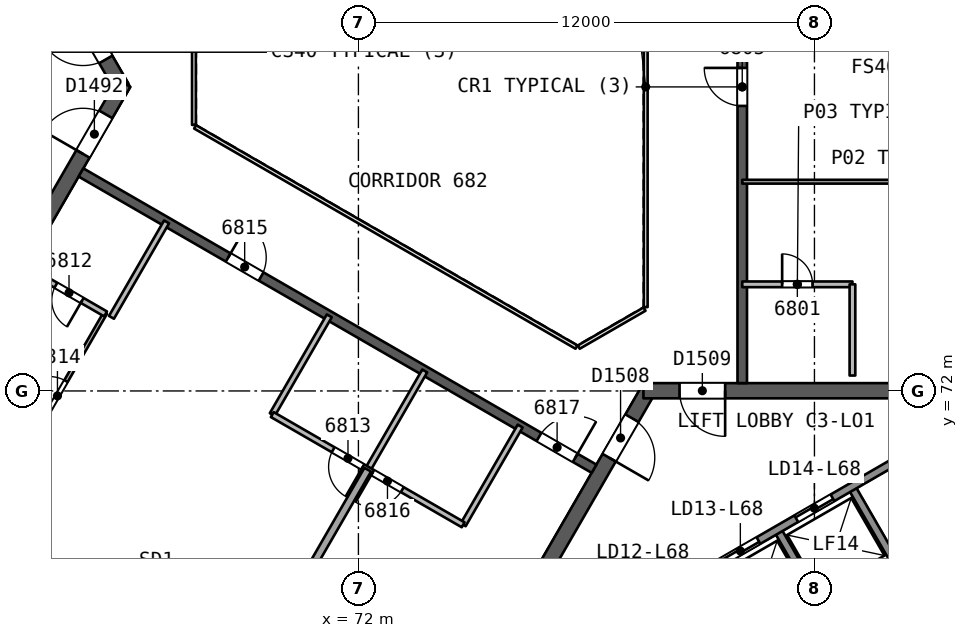
"""IFC4 building model, lengths in metres.
Left out: names, types, materials, properties, quantities, classifications, styles, units other than length and angle.
Written with IfcOpenShell. Run it as: python <this file> out.ifc"""

import sys

from ifc_helpers import new_model, si_unit, direction, frame, frame_2d, origin, place, context, subcontext, project, spatial, rectangle, extrude, element, fill, save


model = new_model("IFC4")
c1 = context("Model", 3, precision=1e-05, world=origin(), true_north=direction((0.0, 1.0)))
c2 = subcontext(c1, "Body", "Model", "MODEL_VIEW")
j1 = project(units=[si_unit("LENGTHUNIT", "METRE"), si_unit("PLANEANGLEUNIT", "RADIAN")], contexts=[c1])
p1 = place(None, origin())
s1 = spatial("IfcSite", under=j1, at=p1, CompositionType="ELEMENT")
p2 = place(p1, origin())
s2 = spatial("IfcBuilding", under=s1, at=p2, CompositionType="ELEMENT")
p3 = place(p2, frame((0.0, 0.0, 277.5)))
s3 = spatial("IfcBuildingStorey", under=s2, at=p3, CompositionType="ELEMENT", Elevation=277.5)
p4 = place(p3, frame((65.769, 80.0, 0.0), z_axis=(0.0, 0.0, 1.0), x_axis=(-0.50000177223, 0.866024380585, 0.0)))
e1 = element("IfcWall", 1, at=p4, inside=s3, PredefinedType="SHEAR", context=c2, shape_type="SweptSolid", body=[
    extrude(rectangle(XDim=10.265, YDim=0.4, at=frame_2d((5.132, 0.0))), origin(), (0.0, 0.0, 1.0), 3.7),
])
p5 = place(p4, frame((0.834, 0.0, 0.0)))
e2 = element("IfcOpeningElement", 2, at=p5, cuts=e1, PredefinedType="OPENING", context=c2, shape_type="SweptSolid", body=[
    extrude(rectangle(XDim=1.2, YDim=2.1, at=frame_2d((0.6, 1.05))), frame((0.0, 0.21, 0.0), z_axis=(0.0, -1.0, 0.0), x_axis=(1.0, 0.0, 0.0)), (0.0, 0.0, 1.0), 0.421),
])
p6 = place(p3, frame((60.737, 71.284, 0.0), z_axis=(0.0, 0.0, 1.0), x_axis=(0.50000547566, 0.866022242388, 0.0)))
e3 = element("IfcWall", 3, at=p6, inside=s3, PredefinedType="SHEAR", context=c2, shape_type="SweptSolid", body=[
    extrude(rectangle(XDim=10.18, YDim=0.4, at=frame_2d((5.09, 0.0))), origin(), (0.0, 0.0, 1.0), 3.7),
])
p7 = place(p6, frame((8.03, 0.0, 0.0)))
e4 = element("IfcOpeningElement", 4, at=p7, cuts=e3, PredefinedType="OPENING", context=c2, shape_type="SweptSolid", body=[
    extrude(rectangle(XDim=1.2, YDim=2.1, at=frame_2d((0.6, 1.05))), frame((0.0, 0.21, 0.0), z_axis=(0.0, -1.0, 0.0), x_axis=(1.0, 0.0, 0.0)), (0.0, 0.0, 1.0), 0.421),
])
p8 = place(p3, frame((79.615, 72.006, 0.0), z_axis=(0.0, 0.0, 1.0), x_axis=(-0.50000177223, -0.866024380585, 0.0)))
e5 = element("IfcWall", 5, at=p8, inside=s3, PredefinedType="SHEAR", context=c2, shape_type="SweptSolid", body=[
    extrude(rectangle(XDim=10.265, YDim=0.4, at=frame_2d((5.132, 0.0))), origin(), (0.0, 0.0, 1.0), 3.7),
])
p9 = place(p8, frame((0.834, 0.0, 0.0)))
e6 = element("IfcOpeningElement", 6, at=p9, cuts=e5, PredefinedType="OPENING", context=c2, shape_type="SweptSolid", body=[
    extrude(rectangle(XDim=1.2, YDim=2.1, at=frame_2d((0.6, 1.05))), frame((0.0, 0.21, 0.0), z_axis=(0.0, -1.0, 0.0), x_axis=(1.0, 0.0, 0.0)), (0.0, 0.0, 1.0), 0.421),
])
p10 = place(p3, frame((89.68, 72.006, 0.0), z_axis=(0.0, 0.0, 1.0), x_axis=(-1.0, 0.0, 0.0)))
e7 = element("IfcWall", 7, at=p10, inside=s3, PredefinedType="SHEAR", context=c2, shape_type="SweptSolid", body=[
    extrude(rectangle(XDim=10.18, YDim=0.4, at=frame_2d((5.09, 0.0))), origin(), (0.0, 0.0, 1.0), 3.7),
])
p11 = place(p10, frame((8.03, 0.0, 0.0)))
e8 = element("IfcOpeningElement", 8, at=p11, cuts=e7, PredefinedType="OPENING", context=c2, shape_type="SweptSolid", body=[
    extrude(rectangle(XDim=1.2, YDim=2.1, at=frame_2d((0.6, 1.05))), frame((0.0, 0.21, 0.0), z_axis=(0.0, -1.0, 0.0), x_axis=(1.0, 0.0, 0.0)), (0.0, 0.0, 1.0), 0.421),
])
p12 = place(p3, frame((82.1, 72.206, 0.0), z_axis=(0.0, 0.0, 1.0), x_axis=(0.0, 1.0, 0.0)))
e9 = element("IfcWall", 9, at=p12, inside=s3, PredefinedType="SHEAR", context=c2, shape_type="SweptSolid", body=[
    extrude(rectangle(XDim=15.588, YDim=0.25, at=frame_2d((7.794, 0.0))), origin(), (0.0, 0.0, 1.0), 3.3),
])
p13 = place(p12, frame((7.294, 0.0, 0.0)))
e10 = element("IfcOpeningElement", 10, at=p13, cuts=e9, PredefinedType="OPENING", context=c2, shape_type="SweptSolid", body=[
    extrude(rectangle(XDim=1.0, YDim=2.1, at=frame_2d((0.5, 1.05))), frame((0.0, 0.135, 0.0), z_axis=(0.0, -1.0, 0.0), x_axis=(1.0, 0.0, 0.0)), (0.0, 0.0, 1.0), 0.271),
])
p14 = place(p3, frame((64.7, 77.748, 0.0), z_axis=(0.0, 0.0, 1.0), x_axis=(0.866026492143, -0.499998114903, 0.0)))
e11 = element("IfcWall", 11, at=p14, inside=s3, PredefinedType="SHEAR", context=c2, shape_type="SweptSolid", body=[
    extrude(rectangle(XDim=15.588, YDim=0.25, at=frame_2d((7.794, 0.0))), origin(), (0.0, 0.0, 1.0), 3.3),
])
p15 = place(p14, frame((4.473, 0.0, 0.0)))
e12 = element("IfcOpeningElement", 12, at=p15, cuts=e11, PredefinedType="OPENING", context=c2, shape_type="SweptSolid", body=[
    extrude(rectangle(XDim=1.0, YDim=2.1, at=frame_2d((0.5, 1.05))), frame((0.0, 0.135, 0.0), z_axis=(0.0, -1.0, 0.0), x_axis=(1.0, 0.0, 0.0)), (0.0, 0.0, 1.0), 0.271),
])
p16 = place(p14, frame((13.917, 0.0, 0.0)))
e13 = element("IfcOpeningElement", 13, at=p16, cuts=e11, PredefinedType="OPENING", context=c2, shape_type="SweptSolid", body=[
    extrude(rectangle(XDim=1.1, YDim=2.1, at=frame_2d((0.55, 1.05))), frame((0.0, 0.135, 0.0), z_axis=(0.0, -1.0, 0.0), x_axis=(1.0, 0.0, 0.0)), (0.0, 0.0, 1.0), 0.271),
])
p17 = place(p3, frame((91.353, 77.506, 0.0), z_axis=(0.0, 0.0, 1.0), x_axis=(-1.0, 0.0, 0.0)))
e14 = element("IfcWall", 14, at=p17, inside=s3, PredefinedType="PARTITIONING", context=c2, shape_type="SweptSolid", body=[
    extrude(rectangle(XDim=9.253, YDim=0.1, at=frame_2d((4.626, 0.0))), origin(), (0.0, 0.0, 1.0), 3.3),
])
p18 = place(p17, frame((3.903, 0.0, 0.0)))
e15 = element("IfcOpeningElement", 15, at=p18, cuts=e14, PredefinedType="OPENING", context=c2, shape_type="SweptSolid", body=[
    extrude(rectangle(XDim=0.9, YDim=2.1, at=frame_2d((0.45, 1.05))), frame((0.0, 0.061, 0.0), z_axis=(0.0, -1.0, 0.0), x_axis=(1.0, 0.0, 0.0)), (0.0, 0.0, 1.0), 0.121),
])
p19 = place(p3, frame((82.1, 74.806, 0.0), z_axis=(0.0, 0.0, 1.0), x_axis=(1.0, 0.0, 0.0)))
e16 = element("IfcWall", 16, at=p19, inside=s3, PredefinedType="PARTITIONING", context=c2, shape_type="SweptSolid", body=[
    extrude(rectangle(XDim=2.9, YDim=0.15, at=frame_2d((1.45, 0.0))), origin(), (0.0, 0.0, 1.0), 3.3),
])
p20 = place(p19, frame((1.05, 0.0, 0.0)))
e17 = element("IfcOpeningElement", 17, at=p20, cuts=e16, PredefinedType="OPENING", context=c2, shape_type="SweptSolid", body=[
    extrude(rectangle(XDim=0.8, YDim=2.1, at=frame_2d((0.4, 1.05))), frame((0.0, 0.085, 0.0), z_axis=(0.0, -1.0, 0.0), x_axis=(1.0, 0.0, 0.0)), (0.0, 0.0, 1.0), 0.171),
])
p21 = place(p3, frame((85.0, 74.806, 0.0), z_axis=(0.0, 0.0, 1.0), x_axis=(0.0, -1.0, 0.0)))
e18 = element("IfcWall", 18, at=p21, inside=s3, PredefinedType="PARTITIONING", context=c2, shape_type="SweptSolid", body=[
    extrude(rectangle(XDim=2.4, YDim=0.15, at=frame_2d((1.2, 0.0))), origin(), (0.0, 0.0, 1.0), 3.3),
])
p22 = place(p3, frame((62.154, 68.534, 0.0), z_axis=(0.0, 0.0, 1.0), x_axis=(0.499987773676, 0.866032462541, 0.0)))
e19 = element("IfcWall", 19, at=p22, inside=s3, PredefinedType="PARTITIONING", context=c2, shape_type="SweptSolid", body=[
    extrude(rectangle(XDim=6.372, YDim=0.1, at=frame_2d((3.186, 0.0))), origin(), (0.0, 0.0, 1.0), 3.3),
])
p23 = place(p22, frame((3.403, 0.0, 0.0)))
e20 = element("IfcOpeningElement", 20, at=p23, cuts=e19, PredefinedType="OPENING", context=c2, shape_type="SweptSolid", body=[
    extrude(rectangle(XDim=0.9, YDim=2.1, at=frame_2d((0.45, 1.05))), frame((0.0, 0.061, 0.0), z_axis=(0.0, -1.0, 0.0), x_axis=(1.0, 0.0, 0.0)), (0.0, 0.0, 1.0), 0.121),
])
p24 = place(p3, frame((65.347, 74.026, 0.0), z_axis=(0.0, 0.0, 1.0), x_axis=(-0.866042797968, 0.49996987118, 0.0)))
e21 = element("IfcWall", 21, at=p24, inside=s3, PredefinedType="PARTITIONING", context=c2, shape_type="SweptSolid", body=[
    extrude(rectangle(XDim=2.221, YDim=0.15, at=frame_2d((1.11, 0.0))), origin(), (0.0, 0.0, 1.0), 3.3),
])
p25 = place(p24, frame((0.711, 0.0, 0.0)))
e22 = element("IfcOpeningElement", 22, at=p25, cuts=e21, PredefinedType="OPENING", context=c2, shape_type="SweptSolid", body=[
    extrude(rectangle(XDim=0.8, YDim=2.1, at=frame_2d((0.4, 1.05))), frame((0.0, 0.085, 0.0), z_axis=(0.0, -1.0, 0.0), x_axis=(1.0, 0.0, 0.0)), (0.0, 0.0, 1.0), 0.171),
])
p26 = place(p3, frame((66.952, 76.448, 0.0), z_axis=(0.0, 0.0, 1.0), x_axis=(-0.499987231761, -0.866032775405, 0.0)))
e23 = element("IfcWall", 23, at=p26, inside=s3, PredefinedType="PARTITIONING", context=c2, shape_type="SweptSolid", body=[
    extrude(rectangle(XDim=2.9, YDim=0.15, at=frame_2d((1.45, 0.0))), origin(), (0.0, 0.0, 1.0), 3.3),
])
p27 = place(p3, frame((73.745, 72.526, 0.0), z_axis=(0.0, 0.0, 1.0), x_axis=(-0.50002537861, -0.866010750942, 0.0)))
e24 = element("IfcWall", 24, at=p27, inside=s3, PredefinedType="PARTITIONING", context=c2, shape_type="SweptSolid", body=[
    extrude(rectangle(XDim=3.0, YDim=0.15, at=frame_2d((1.5, 0.0))), origin(), (0.0, 0.0, 1.0), 3.3),
])
p28 = place(p3, frame((69.734, 71.378, 0.0), z_axis=(0.0, 0.0, 1.0), x_axis=(0.499990139034, 0.866031096941, 0.0)))
e25 = element("IfcWall", 25, at=p28, inside=s3, PredefinedType="PARTITIONING", context=c2, shape_type="SweptSolid", body=[
    extrude(rectangle(XDim=3.0, YDim=0.15, at=frame_2d((1.5, 0.0))), origin(), (0.0, 0.0, 1.0), 3.3),
])
p29 = place(p3, frame((69.118, 64.512, 0.0), z_axis=(0.0, 0.0, 1.0), x_axis=(0.499997275202, 0.866026976941, 0.0)))
e26 = element("IfcWall", 26, at=p29, inside=s3, PredefinedType="PARTITIONING", context=c2, shape_type="SweptSolid", body=[
    extrude(rectangle(XDim=6.254, YDim=0.2, at=frame_2d((3.127, 0.0))), origin(), (0.0, 0.0, 1.0), 3.3),
])
p30 = place(p3, frame((76.257, 71.076, 0.0), z_axis=(0.0, 0.0, 1.0), x_axis=(-0.499990139034, -0.866031096941, 0.0)))
e27 = element("IfcWall", 27, at=p30, inside=s3, PredefinedType="PARTITIONING", context=c2, shape_type="SweptSolid", body=[
    extrude(rectangle(XDim=3.0, YDim=0.15, at=frame_2d((1.5, 0.0))), origin(), (0.0, 0.0, 1.0), 3.3),
])
p31 = place(p3, frame((74.757, 68.478, 0.0), z_axis=(0.0, 0.0, 1.0), x_axis=(-0.86601454848, 0.500018801468, 0.0)))
e28 = element("IfcWall", 28, at=p31, inside=s3, PredefinedType="PARTITIONING", context=c2, shape_type="SweptSolid", body=[
    extrude(rectangle(XDim=5.8, YDim=0.15, at=frame_2d((2.9, 0.0))), origin(), (0.0, 0.0, 1.0), 3.3),
])
p32 = place(p31, frame((3.05, 0.0, 0.0)))
e29 = element("IfcOpeningElement", 29, at=p32, cuts=e28, PredefinedType="OPENING", context=c2, shape_type="SweptSolid", body=[
    extrude(rectangle(XDim=0.9, YDim=2.1, at=frame_2d((0.45, 1.05))), frame((0.0, 0.085, 0.0), z_axis=(0.0, -1.0, 0.0), x_axis=(1.0, 0.0, 0.0)), (0.0, 0.0, 1.0), 0.171),
])
p33 = place(p31, frame((1.85, 0.0, 0.0)))
e30 = element("IfcOpeningElement", 30, at=p33, cuts=e28, PredefinedType="OPENING", context=c2, shape_type="SweptSolid", body=[
    extrude(rectangle(XDim=0.9, YDim=2.1, at=frame_2d((0.45, 1.05))), frame((0.0, 0.085, 0.0), z_axis=(0.0, -1.0, 0.0), x_axis=(1.0, 0.0, 0.0)), (0.0, 0.0, 1.0), 0.171),
])
p34 = place(p3, frame((87.299, 53.843, 0.0), z_axis=(0.0, 0.0, 1.0), x_axis=(-0.866024279277, 0.500001947699, 0.0)))
e31 = element("IfcWall", 31, at=p34, inside=s3, PredefinedType="SOLIDWALL", context=c2, shape_type="SweptSolid", body=[
    extrude(rectangle(XDim=47.46, YDim=0.3, at=frame_2d((23.73, 0.0))), origin(), (0.0, 0.0, 1.0), 3.3),
])
p35 = place(p34, frame((17.308, 0.0, 0.0)))
e32 = element("IfcOpeningElement", 32, at=p35, cuts=e31, PredefinedType="OPENING", context=c2, shape_type="SweptSolid", body=[
    extrude(rectangle(XDim=2.4, YDim=2.4, at=frame_2d((1.2, 1.2))), frame((0.0, 0.161, 0.0), z_axis=(0.0, -1.0, 0.0), x_axis=(1.0, 0.0, 0.0)), (0.0, 0.0, 1.0), 0.321),
])
p36 = place(p34, frame((37.135, 0.0, 0.0)))
e33 = element("IfcOpeningElement", 33, at=p36, cuts=e31, PredefinedType="OPENING", context=c2, shape_type="SweptSolid", body=[
    extrude(rectangle(XDim=2.4, YDim=2.4, at=frame_2d((1.2, 1.2))), frame((0.0, 0.161, 0.0), z_axis=(0.0, -1.0, 0.0), x_axis=(1.0, 0.0, 0.0)), (0.0, 0.0, 1.0), 0.321),
])
p37 = place(p34, frame((23.901, 0.0, 0.0)))
e34 = element("IfcOpeningElement", 34, at=p37, cuts=e31, PredefinedType="OPENING", context=c2, shape_type="SweptSolid", body=[
    extrude(rectangle(XDim=2.4, YDim=2.4, at=frame_2d((1.2, 1.2))), frame((0.0, 0.161, 0.0), z_axis=(0.0, -1.0, 0.0), x_axis=(1.0, 0.0, 0.0)), (0.0, 0.0, 1.0), 0.321),
])
p38 = place(p3, frame((83.024, 68.352, 0.0), z_axis=(0.0, 0.0, 1.0), x_axis=(0.50000366821, -0.866023285932, 0.0)))
e35 = element("IfcWall", 35, at=p38, inside=s3, PredefinedType="SOLIDWALL", context=c2, shape_type="SweptSolid", body=[
    extrude(rectangle(XDim=2.48, YDim=0.2, at=frame_2d((1.24, 0.0))), origin(), (0.0, 0.0, 1.0), 3.3),
])
p39 = place(p3, frame((84.973, 69.477, 0.0), z_axis=(0.0, 0.0, 1.0), x_axis=(0.499996545922, -0.866027397988, 0.0)))
e36 = element("IfcWall", 36, at=p39, inside=s3, PredefinedType="SOLIDWALL", context=c2, shape_type="SweptSolid", body=[
    extrude(rectangle(XDim=2.75, YDim=0.2, at=frame_2d((1.375, 0.0))), origin(), (0.0, 0.0, 1.0), 3.3),
])
p40 = place(p3, frame((77.135, 64.952, 0.0), z_axis=(0.0, 0.0, 1.0), x_axis=(0.866031916153, 0.499988720078, 0.0)))
e37 = element("IfcWall", 37, at=p40, inside=s3, PredefinedType="SOLIDWALL", context=c2, shape_type="SweptSolid", body=[
    extrude(rectangle(XDim=11.35, YDim=0.2, at=frame_2d((5.675, 0.0))), origin(), (0.0, 0.0, 1.0), 3.3),
])
p41 = place(p40, frame((2.875, 0.0, 0.0)))
e38 = element("IfcOpeningElement", 38, at=p41, cuts=e37, PredefinedType="OPENING", context=c2, shape_type="SweptSolid", body=[
    extrude(rectangle(XDim=1.1, YDim=2.1, at=frame_2d((0.55, 1.05))), frame((0.0, 0.11, 0.0), z_axis=(0.0, -1.0, 0.0), x_axis=(1.0, 0.0, 0.0)), (0.0, 0.0, 1.0), 0.221),
])
p42 = place(p40, frame((5.125, 0.0, 0.0)))
e39 = element("IfcOpeningElement", 39, at=p42, cuts=e37, PredefinedType="OPENING", context=c2, shape_type="SweptSolid", body=[
    extrude(rectangle(XDim=1.1, YDim=2.1, at=frame_2d((0.55, 1.05))), frame((0.0, 0.11, 0.0), z_axis=(0.0, -1.0, 0.0), x_axis=(1.0, 0.0, 0.0)), (0.0, 0.0, 1.0), 0.221),
])
p43 = place(p40, frame((7.375, 0.0, 0.0)))
e40 = element("IfcOpeningElement", 40, at=p43, cuts=e37, PredefinedType="OPENING", context=c2, shape_type="SweptSolid", body=[
    extrude(rectangle(XDim=1.1, YDim=2.1, at=frame_2d((0.55, 1.05))), frame((0.0, 0.11, 0.0), z_axis=(0.0, -1.0, 0.0), x_axis=(1.0, 0.0, 0.0)), (0.0, 0.0, 1.0), 0.221),
])
p44 = place(p3, frame((79.56, 74.206, 0.0), z_axis=(0.0, 0.0, 1.0), x_axis=(0.0, 1.0, 0.0)))
e41 = element("IfcWall", 41, at=p44, inside=s3, PredefinedType="PARTITIONING", context=c2, shape_type="SweptSolid", body=[
    extrude(rectangle(XDim=11.588, YDim=0.1, at=frame_2d((5.794, 0.0))), origin(), (0.0, 0.0, 1.0), 3.3),
])
p45 = place(p3, frame((67.672, 81.0, 0.0), z_axis=(0.0, 0.0, 1.0), x_axis=(0.0, -1.0, 0.0)))
e42 = element("IfcWall", 42, at=p45, inside=s3, PredefinedType="PARTITIONING", context=c2, shape_type="SweptSolid", body=[
    extrude(rectangle(XDim=2.0, YDim=0.1, at=frame_2d((1.0, 0.0))), origin(), (0.0, 0.0, 1.0), 3.3),
])
p46 = place(p3, frame((67.702, 78.948, 0.0), z_axis=(0.0, 0.0, 1.0), x_axis=(0.866026658274, -0.499997827154, 0.0)))
e43 = element("IfcWall", 43, at=p46, inside=s3, PredefinedType="PARTITIONING", context=c2, shape_type="SweptSolid", body=[
    extrude(rectangle(XDim=11.588, YDim=0.1, at=frame_2d((5.794, 0.0))), origin(), (0.0, 0.0, 1.0), 3.3),
])
p47 = place(p3, frame((77.798, 73.154, 0.0), z_axis=(0.0, 0.0, 1.0), x_axis=(0.866041268327, 0.499972520799, 0.0)))
e44 = element("IfcWall", 44, at=p47, inside=s3, PredefinedType="PARTITIONING", context=c2, shape_type="SweptSolid", body=[
    extrude(rectangle(XDim=2.0, YDim=0.1, at=frame_2d((1.0, 0.0))), origin(), (0.0, 0.0, 1.0), 3.3),
])
p48 = place(p20, origin())
e45 = element("IfcDoor", 45, at=p48, inside=s3, OperationType="SINGLE_SWING_LEFT", PredefinedType="NOTDEFINED", context=c2, shape_type="SweptSolid", body=[
    extrude(rectangle(XDim=0.8, YDim=2.1, at=frame_2d((0.4, 1.05))), frame((0.0, 0.025, 0.0), z_axis=(0.0, -1.0, 0.0), x_axis=(1.0, 0.0, 0.0)), (0.0, 0.0, 1.0), 0.05),
])
fill(e17, e45)
p49 = place(p13, origin())
e46 = element("IfcDoor", 46, at=p49, inside=s3, OperationType="SINGLE_SWING_RIGHT", PredefinedType="NOTDEFINED", context=c2, shape_type="SweptSolid", body=[
    extrude(rectangle(XDim=1.0, YDim=2.1, at=frame_2d((0.5, 1.05))), frame((0.0, 0.025, 0.0), z_axis=(0.0, -1.0, 0.0), x_axis=(1.0, 0.0, 0.0)), (0.0, 0.0, 1.0), 0.05),
])
fill(e10, e46)
p50 = place(p25, origin())
e47 = element("IfcDoor", 47, at=p50, inside=s3, OperationType="SINGLE_SWING_LEFT", PredefinedType="NOTDEFINED", context=c2, shape_type="SweptSolid", body=[
    extrude(rectangle(XDim=0.8, YDim=2.1, at=frame_2d((0.4, 1.05))), frame((0.0, 0.025, 0.0), z_axis=(0.0, -1.0, 0.0), x_axis=(1.0, 0.0, 0.0)), (0.0, 0.0, 1.0), 0.05),
])
fill(e22, e47)
p51 = place(p32, origin())
e48 = element("IfcDoor", 48, at=p51, inside=s3, OperationType="SINGLE_SWING_LEFT", PredefinedType="NOTDEFINED", context=c2, shape_type="SweptSolid", body=[
    extrude(rectangle(XDim=0.9, YDim=2.1, at=frame_2d((0.45, 1.05))), frame((0.0, 0.025, 0.0), z_axis=(0.0, -1.0, 0.0), x_axis=(1.0, 0.0, 0.0)), (0.0, 0.0, 1.0), 0.05),
])
fill(e29, e48)
p52 = place(p23, origin())
e49 = element("IfcDoor", 49, at=p52, inside=s3, OperationType="SINGLE_SWING_LEFT", PredefinedType="NOTDEFINED", context=c2, shape_type="SweptSolid", body=[
    extrude(rectangle(XDim=0.9, YDim=2.1, at=frame_2d((0.45, 1.05))), frame((0.0, 0.025, 0.0), z_axis=(0.0, -1.0, 0.0), x_axis=(1.0, 0.0, 0.0)), (0.0, 0.0, 1.0), 0.05),
])
fill(e20, e49)
p53 = place(p15, origin())
e50 = element("IfcDoor", 50, at=p53, inside=s3, OperationType="SINGLE_SWING_LEFT", PredefinedType="NOTDEFINED", context=c2, shape_type="SweptSolid", body=[
    extrude(rectangle(XDim=1.0, YDim=2.1, at=frame_2d((0.5, 1.05))), frame((0.0, 0.025, 0.0), z_axis=(0.0, -1.0, 0.0), x_axis=(1.0, 0.0, 0.0)), (0.0, 0.0, 1.0), 0.05),
])
fill(e12, e50)
p54 = place(p33, origin())
e51 = element("IfcDoor", 51, at=p54, inside=s3, OperationType="SINGLE_SWING_RIGHT", PredefinedType="NOTDEFINED", context=c2, shape_type="SweptSolid", body=[
    extrude(rectangle(XDim=0.9, YDim=2.1, at=frame_2d((0.45, 1.05))), frame((0.0, 0.025, 0.0), z_axis=(0.0, -1.0, 0.0), x_axis=(1.0, 0.0, 0.0)), (0.0, 0.0, 1.0), 0.05),
])
fill(e30, e51)
p55 = place(p16, origin())
e52 = element("IfcDoor", 52, at=p55, inside=s3, OperationType="SINGLE_SWING_RIGHT", PredefinedType="NOTDEFINED", context=c2, shape_type="SweptSolid", body=[
    extrude(rectangle(XDim=1.1, YDim=2.1, at=frame_2d((0.55, 1.05))), frame((0.0, 0.025, 0.0), z_axis=(0.0, -1.0, 0.0), x_axis=(1.0, 0.0, 0.0)), (0.0, 0.0, 1.0), 0.05),
])
fill(e13, e52)
p56 = place(p5, origin())
e53 = element("IfcDoor", 53, at=p56, inside=s3, OperationType="SINGLE_SWING_RIGHT", PredefinedType="NOTDEFINED", context=c2, shape_type="SweptSolid", body=[
    extrude(rectangle(XDim=1.2, YDim=2.1, at=frame_2d((0.6, 1.05))), frame((0.0, 0.025, 0.0), z_axis=(0.0, -1.0, 0.0), x_axis=(1.0, 0.0, 0.0)), (0.0, 0.0, 1.0), 0.05),
])
fill(e2, e53)
p57 = place(p7, origin())
e54 = element("IfcDoor", 54, at=p57, inside=s3, OperationType="SINGLE_SWING_LEFT", PredefinedType="NOTDEFINED", context=c2, shape_type="SweptSolid", body=[
    extrude(rectangle(XDim=1.2, YDim=2.1, at=frame_2d((0.6, 1.05))), frame((0.0, 0.025, 0.0), z_axis=(0.0, -1.0, 0.0), x_axis=(1.0, 0.0, 0.0)), (0.0, 0.0, 1.0), 0.05),
])
fill(e4, e54)
p58 = place(p9, origin())
e55 = element("IfcDoor", 55, at=p58, inside=s3, OperationType="SINGLE_SWING_RIGHT", PredefinedType="NOTDEFINED", context=c2, shape_type="SweptSolid", body=[
    extrude(rectangle(XDim=1.2, YDim=2.1, at=frame_2d((0.6, 1.05))), frame((0.0, 0.025, 0.0), z_axis=(0.0, -1.0, 0.0), x_axis=(1.0, 0.0, 0.0)), (0.0, 0.0, 1.0), 0.05),
])
fill(e6, e55)
p59 = place(p11, origin())
e56 = element("IfcDoor", 56, at=p59, inside=s3, OperationType="SINGLE_SWING_LEFT", PredefinedType="NOTDEFINED", context=c2, shape_type="SweptSolid", body=[
    extrude(rectangle(XDim=1.2, YDim=2.1, at=frame_2d((0.6, 1.05))), frame((0.0, 0.025, 0.0), z_axis=(0.0, -1.0, 0.0), x_axis=(1.0, 0.0, 0.0)), (0.0, 0.0, 1.0), 0.05),
])
fill(e8, e56)
p60 = place(p42, origin())
e57 = element("IfcDoor", 57, at=p60, inside=s3, OperationType="SLIDING_TO_RIGHT", PredefinedType="NOTDEFINED", context=c2, shape_type="SweptSolid", body=[
    extrude(rectangle(XDim=1.1, YDim=2.1, at=frame_2d((0.55, 1.05))), frame((0.0, 0.025, 0.0), z_axis=(0.0, -1.0, 0.0), x_axis=(1.0, 0.0, 0.0)), (0.0, 0.0, 1.0), 0.05),
])
fill(e39, e57)
p61 = place(p43, origin())
e58 = element("IfcDoor", 58, at=p61, inside=s3, OperationType="SLIDING_TO_LEFT", PredefinedType="NOTDEFINED", context=c2, shape_type="SweptSolid", body=[
    extrude(rectangle(XDim=1.1, YDim=2.1, at=frame_2d((0.55, 1.05))), frame((0.0, 0.025, 0.0), z_axis=(0.0, -1.0, 0.0), x_axis=(1.0, 0.0, 0.0)), (0.0, 0.0, 1.0), 0.05),
])
fill(e40, e58)
save(model, sys.argv[1])
